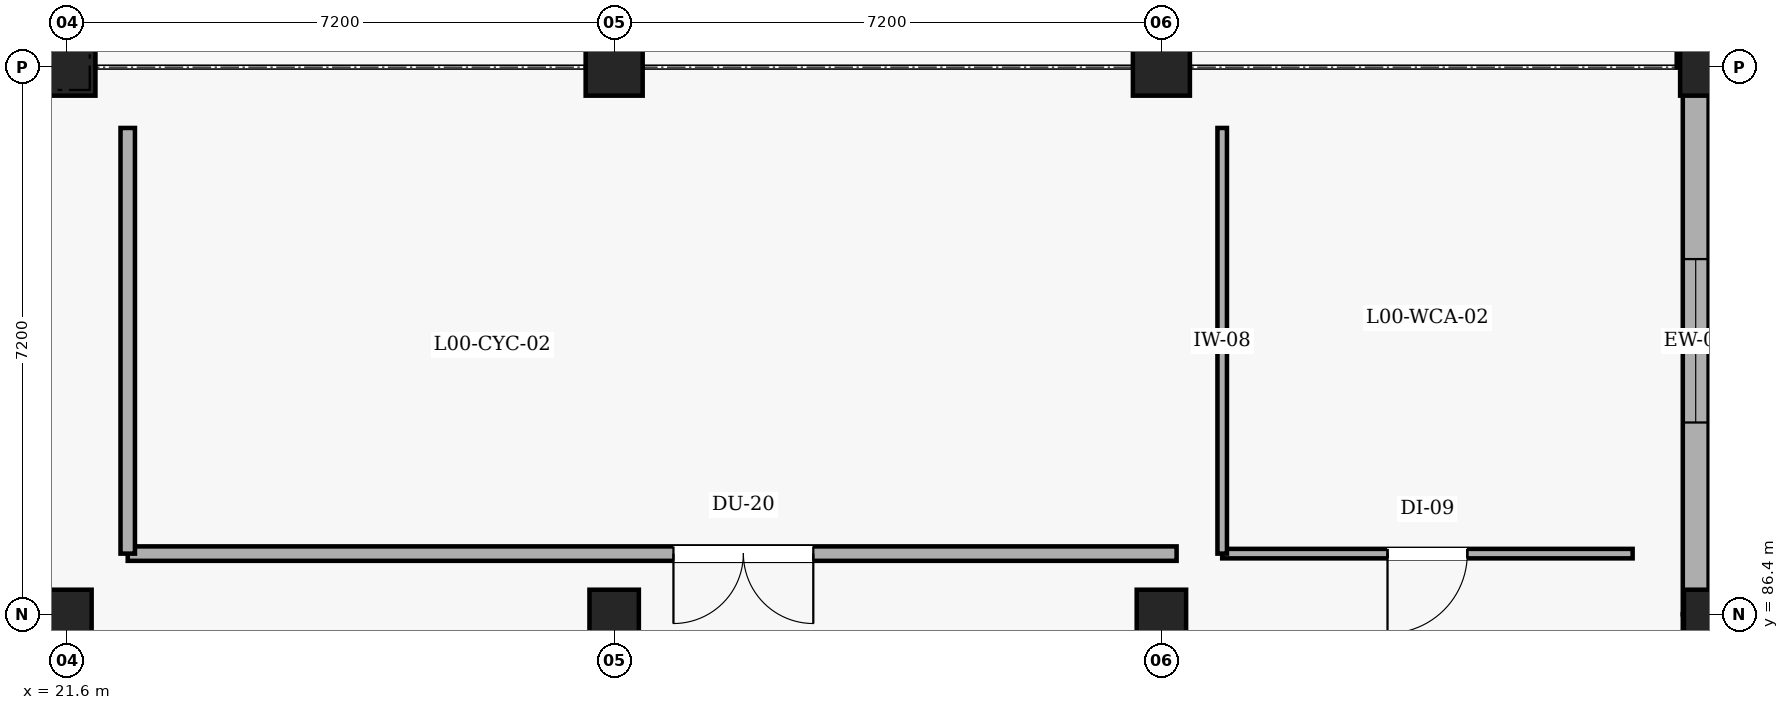
"""IFC4 building model, lengths in metres.
Left out: names, types, materials, properties, quantities, classifications, styles, units other than length and angle.
Written with IfcOpenShell. Run it as: python <this file> out.ifc"""

import sys

from ifc_helpers import new_model, si_unit, direction, frame, frame_2d, origin, origin_2d, place, context, subcontext, project, spatial, rectangle, extrude, element, fill, save


model = new_model("IFC4")
c1 = context("Model", 3, precision=1e-05, world=origin(), true_north=direction((0.0, 1.0)))
c2 = subcontext(c1, "Body", "Model", "MODEL_VIEW")
j1 = project(units=[si_unit("LENGTHUNIT", "METRE"), si_unit("PLANEANGLEUNIT", "RADIAN")], contexts=[c1])
p1 = place(None, origin())
s1 = spatial("IfcSite", under=j1, at=p1, CompositionType="ELEMENT")
p2 = place(p1, origin())
s2 = spatial("IfcBuilding", under=s1, at=p2, CompositionType="ELEMENT")
p3 = place(p2, origin())
s3 = spatial("IfcBuildingStorey", under=s2, at=p3, CompositionType="ELEMENT", Elevation=0.0)
p4 = place(p3, frame((21.6, 93.825, 0.0), z_axis=(0.0, 0.0, 1.0), x_axis=(-1.0, 0.0, 0.0)))
e1 = element("IfcWall", 1, at=p4, inside=s3, PredefinedType="SHEAR", context=c2, shape_type="SweptSolid", body=[
    extrude(rectangle(XDim=14.4, YDim=0.45, at=frame_2d((7.2, 0.0))), origin(), (0.0, 0.0, 1.0), 5.4),
])
p5 = place(p3, frame((7.2, 86.225, 0.0), z_axis=(0.0, 0.0, 1.0), x_axis=(1.0, 0.0, 0.0)))
e2 = element("IfcWall", 2, at=p5, inside=s3, PredefinedType="SHEAR", context=c2, shape_type="SweptSolid", body=[
    extrude(rectangle(XDim=14.4, YDim=0.35, at=frame_2d((7.2, 0.0))), origin(), (0.0, 0.0, 1.0), 5.4),
])
p6 = place(p3, frame((21.6, 86.4, 0.0), z_axis=(0.0, 0.0, 1.0), x_axis=(1.0, 0.0, 0.0)))
e3 = element("IfcColumn", 3, at=p6, inside=s3, PredefinedType="COLUMN", context=c2, shape_type="SweptSolid", body=[
    extrude(rectangle(XDim=0.65, YDim=0.65, at=origin_2d()), origin(), (0.0, 0.0, 1.0), 5.12),
])
p7 = place(p3, frame((21.6, 93.6, 0.0), z_axis=(0.0, 0.0, 1.0), x_axis=(1.0, 0.0, 0.0)))
e4 = element("IfcColumn", 4, at=p7, inside=s3, PredefinedType="COLUMN", context=c2, shape_type="SweptSolid", body=[
    extrude(rectangle(XDim=0.75, YDim=0.75, at=origin_2d()), origin(), (0.0, 0.0, 1.0), 5.08),
])
p8 = place(p3, frame((28.8, 86.4, 0.0), z_axis=(0.0, 0.0, 1.0), x_axis=(1.0, 0.0, 0.0)))
e5 = element("IfcColumn", 5, at=p8, inside=s3, PredefinedType="COLUMN", context=c2, shape_type="SweptSolid", body=[
    extrude(rectangle(XDim=0.65, YDim=0.65, at=origin_2d()), origin(), (0.0, 0.0, 1.0), 5.12),
])
p9 = place(p3, frame((28.8, 93.6, 0.0), z_axis=(0.0, 0.0, 1.0), x_axis=(1.0, 0.0, 0.0)))
e6 = element("IfcColumn", 6, at=p9, inside=s3, PredefinedType="COLUMN", context=c2, shape_type="SweptSolid", body=[
    extrude(rectangle(XDim=0.75, YDim=0.75, at=origin_2d()), origin(), (0.0, 0.0, 1.0), 5.08),
])
p10 = place(p3, frame((36.0, 86.4, 0.0), z_axis=(0.0, 0.0, 1.0), x_axis=(1.0, 0.0, 0.0)))
e7 = element("IfcColumn", 7, at=p10, inside=s3, PredefinedType="COLUMN", context=c2, shape_type="SweptSolid", body=[
    extrude(rectangle(XDim=0.65, YDim=0.65, at=origin_2d()), origin(), (0.0, 0.0, 1.0), 5.12),
])
p11 = place(p3, frame((36.0, 93.6, 0.0), z_axis=(0.0, 0.0, 1.0), x_axis=(1.0, 0.0, 0.0)))
e8 = element("IfcColumn", 8, at=p11, inside=s3, PredefinedType="COLUMN", context=c2, shape_type="SweptSolid", body=[
    extrude(rectangle(XDim=0.75, YDim=0.75, at=origin_2d()), origin(), (0.0, 0.0, 1.0), 5.08),
])
p12 = place(p3, frame((43.2, 86.4, 0.0), z_axis=(0.0, 0.0, 1.0), x_axis=(0.0, 1.0, 0.0)))
e9 = element("IfcColumn", 9, at=p12, inside=s3, PredefinedType="COLUMN", context=c2, shape_type="SweptSolid", body=[
    extrude(rectangle(XDim=0.65, YDim=0.65, at=origin_2d()), origin(), (0.0, 0.0, 1.0), 5.12),
])
p13 = place(p3, frame((43.2, 93.6, 0.0), z_axis=(0.0, 0.0, 1.0), x_axis=(0.0, 1.0, 0.0)))
e10 = element("IfcColumn", 10, at=p13, inside=s3, PredefinedType="COLUMN", context=c2, shape_type="SweptSolid", body=[
    extrude(rectangle(XDim=0.75, YDim=0.75, at=origin_2d()), origin(), (0.0, 0.0, 1.0), 5.08),
])
p14 = place(p3, frame((42.99, 100.8, 0.0), z_axis=(0.0, 0.0, 1.0), x_axis=(0.0, -1.0, 0.0)))
e11 = element("IfcWall", 11, at=p14, inside=s3, PredefinedType="SOLIDWALL", context=c2, shape_type="SweptSolid", body=[
    extrude(rectangle(XDim=7.2, YDim=0.42, at=frame_2d((3.6, 0.0))), origin(), (0.0, 0.0, 1.0), 4.75),
])
p15 = place(p14, frame((2.575, 0.0, 0.9)))
e12 = element("IfcOpeningElement", 12, at=p15, cuts=e11, PredefinedType="OPENING", context=c2, shape_type="SweptSolid", body=[
    extrude(rectangle(XDim=2.05, YDim=1.6, at=frame_2d((1.025, 0.8))), frame((0.0, 0.22, 0.0), z_axis=(0.0, -1.0, 0.0), x_axis=(1.0, 0.0, 0.0)), (0.0, 0.0, 1.0), 0.44),
])
p16 = place(p3, frame((43.03, 93.6, 0.0), z_axis=(0.0, 0.0, 1.0), x_axis=(0.0, -1.0, 0.0)))
e13 = element("IfcWall", 13, at=p16, inside=s3, PredefinedType="SOLIDWALL", context=c2, shape_type="SweptSolid", body=[
    extrude(rectangle(XDim=7.2, YDim=0.34, at=frame_2d((3.6, 0.0))), origin(), (0.0, 0.0, 1.0), 4.79),
])
p17 = place(p16, frame((2.525, 0.0, 0.9)))
e14 = element("IfcOpeningElement", 14, at=p17, cuts=e13, PredefinedType="OPENING", context=c2, shape_type="SweptSolid", body=[
    extrude(rectangle(XDim=2.15, YDim=1.65, at=frame_2d((1.075, 0.825))), frame((0.0, 0.18, 0.0), z_axis=(0.0, -1.0, 0.0), x_axis=(1.0, 0.0, 0.0)), (0.0, 0.0, 1.0), 0.36),
])
p18 = place(p3, frame((43.03, 86.4, 0.0), z_axis=(0.0, 0.0, 1.0), x_axis=(0.0, -1.0, 0.0)))
e15 = element("IfcWall", 15, at=p18, inside=s3, PredefinedType="SOLIDWALL", context=c2, shape_type="SweptSolid", body=[
    extrude(rectangle(XDim=7.2, YDim=0.34, at=frame_2d((3.6, 0.0))), origin(), (0.0, 0.0, 1.0), 4.79),
])
p19 = place(p18, frame((1.7, 0.0, 0.0)))
e16 = element("IfcOpeningElement", 16, at=p19, cuts=e15, PredefinedType="OPENING", context=c2, shape_type="SweptSolid", body=[
    extrude(rectangle(XDim=3.8, YDim=2.7, at=frame_2d((1.9, 1.35))), frame((0.0, 0.18, 0.0), z_axis=(0.0, -1.0, 0.0), x_axis=(1.0, 0.0, 0.0)), (0.0, 0.0, 1.0), 0.36),
])
p20 = place(p3, frame((36.2, 87.2, 0.0), z_axis=(0.0, 0.0, 1.0), x_axis=(-1.0, 0.0, 0.0)))
e17 = element("IfcWall", 17, at=p20, inside=s3, PredefinedType="PARTITIONING", context=c2, shape_type="SweptSolid", body=[
    extrude(rectangle(XDim=13.8, YDim=0.19, at=frame_2d((6.9, 0.0))), origin(), (0.0, 0.0, 1.0), 4.72),
])
p21 = place(p20, frame((4.78, 0.0, 0.0)))
e18 = element("IfcOpeningElement", 18, at=p21, cuts=e17, PredefinedType="OPENING", context=c2, shape_type="SweptSolid", body=[
    extrude(rectangle(XDim=1.84, YDim=2.24, at=frame_2d((0.92, 1.12))), frame((0.0, 0.105, 0.0), z_axis=(0.0, -1.0, 0.0), x_axis=(1.0, 0.0, 0.0)), (0.0, 0.0, 1.0), 0.21),
])
p22 = place(p3, frame((22.4, 87.2, 0.0), z_axis=(0.0, 0.0, 1.0), x_axis=(0.0, 1.0, 0.0)))
e19 = element("IfcWall", 19, at=p22, inside=s3, PredefinedType="PARTITIONING", context=c2, shape_type="SweptSolid", body=[
    extrude(rectangle(XDim=5.6, YDim=0.19, at=frame_2d((2.8, 0.0))), origin(), (0.0, 0.0, 1.0), 4.79),
])
p23 = place(p3, frame((42.2, 87.2, 0.0), z_axis=(0.0, 0.0, 1.0), x_axis=(-1.0, 0.0, 0.0)))
e20 = element("IfcWall", 20, at=p23, inside=s3, PredefinedType="PARTITIONING", context=c2, shape_type="SweptSolid", body=[
    extrude(rectangle(XDim=5.4, YDim=0.125, at=frame_2d((2.7, 0.0))), origin(), (0.0, 0.0, 1.0), 5.05),
])
p24 = place(p23, frame((2.175, 0.0, 0.0)))
e21 = element("IfcOpeningElement", 21, at=p24, cuts=e20, PredefinedType="OPENING", context=c2, shape_type="SweptSolid", body=[
    extrude(rectangle(XDim=1.05, YDim=2.1, at=frame_2d((0.525, 1.05))), frame((0.0, 0.073, 0.0), z_axis=(0.0, -1.0, 0.0), x_axis=(1.0, 0.0, 0.0)), (0.0, 0.0, 1.0), 0.145),
])
p25 = place(p3, frame((36.8, 87.2, 0.0), z_axis=(0.0, 0.0, 1.0), x_axis=(0.0, 1.0, 0.0)))
e22 = element("IfcWall", 22, at=p25, inside=s3, PredefinedType="PARTITIONING", context=c2, shape_type="SweptSolid", body=[
    extrude(rectangle(XDim=5.6, YDim=0.125, at=frame_2d((2.8, 0.0))), origin(), (0.0, 0.0, 1.0), 4.79),
])
p26 = place(p17, origin())
e23 = element("IfcWindow", 23, at=p26, inside=s3, PartitioningType="SINGLE_PANEL", PredefinedType="WINDOW", context=c2, shape_type="SweptSolid", body=[
    extrude(rectangle(XDim=2.15, YDim=1.65, at=frame_2d((1.075, 0.825))), frame((0.0, 0.03, 0.0), z_axis=(0.0, -1.0, 0.0), x_axis=(1.0, 0.0, 0.0)), (0.0, 0.0, 1.0), 0.06),
])
fill(e14, e23)
p27 = place(p21, origin())
e24 = element("IfcDoor", 24, at=p27, inside=s3, OperationType="DOUBLE_DOOR_SINGLE_SWING", PredefinedType="DOOR", context=c2, shape_type="SweptSolid", body=[
    extrude(rectangle(XDim=1.84, YDim=2.24, at=frame_2d((0.92, 1.12))), frame((0.0, 0.025, 0.0), z_axis=(0.0, -1.0, 0.0), x_axis=(1.0, 0.0, 0.0)), (0.0, 0.0, 1.0), 0.05),
])
fill(e18, e24)
p28 = place(p24, origin())
e25 = element("IfcDoor", 25, at=p28, inside=s3, OperationType="SINGLE_SWING_RIGHT", PredefinedType="DOOR", context=c2, shape_type="SweptSolid", body=[
    extrude(rectangle(XDim=1.05, YDim=2.1, at=frame_2d((0.525, 1.05))), frame((0.0, 0.025, 0.0), z_axis=(0.0, -1.0, 0.0), x_axis=(1.0, 0.0, 0.0)), (0.0, 0.0, 1.0), 0.05),
])
fill(e21, e25)
save(model, sys.argv[1])
